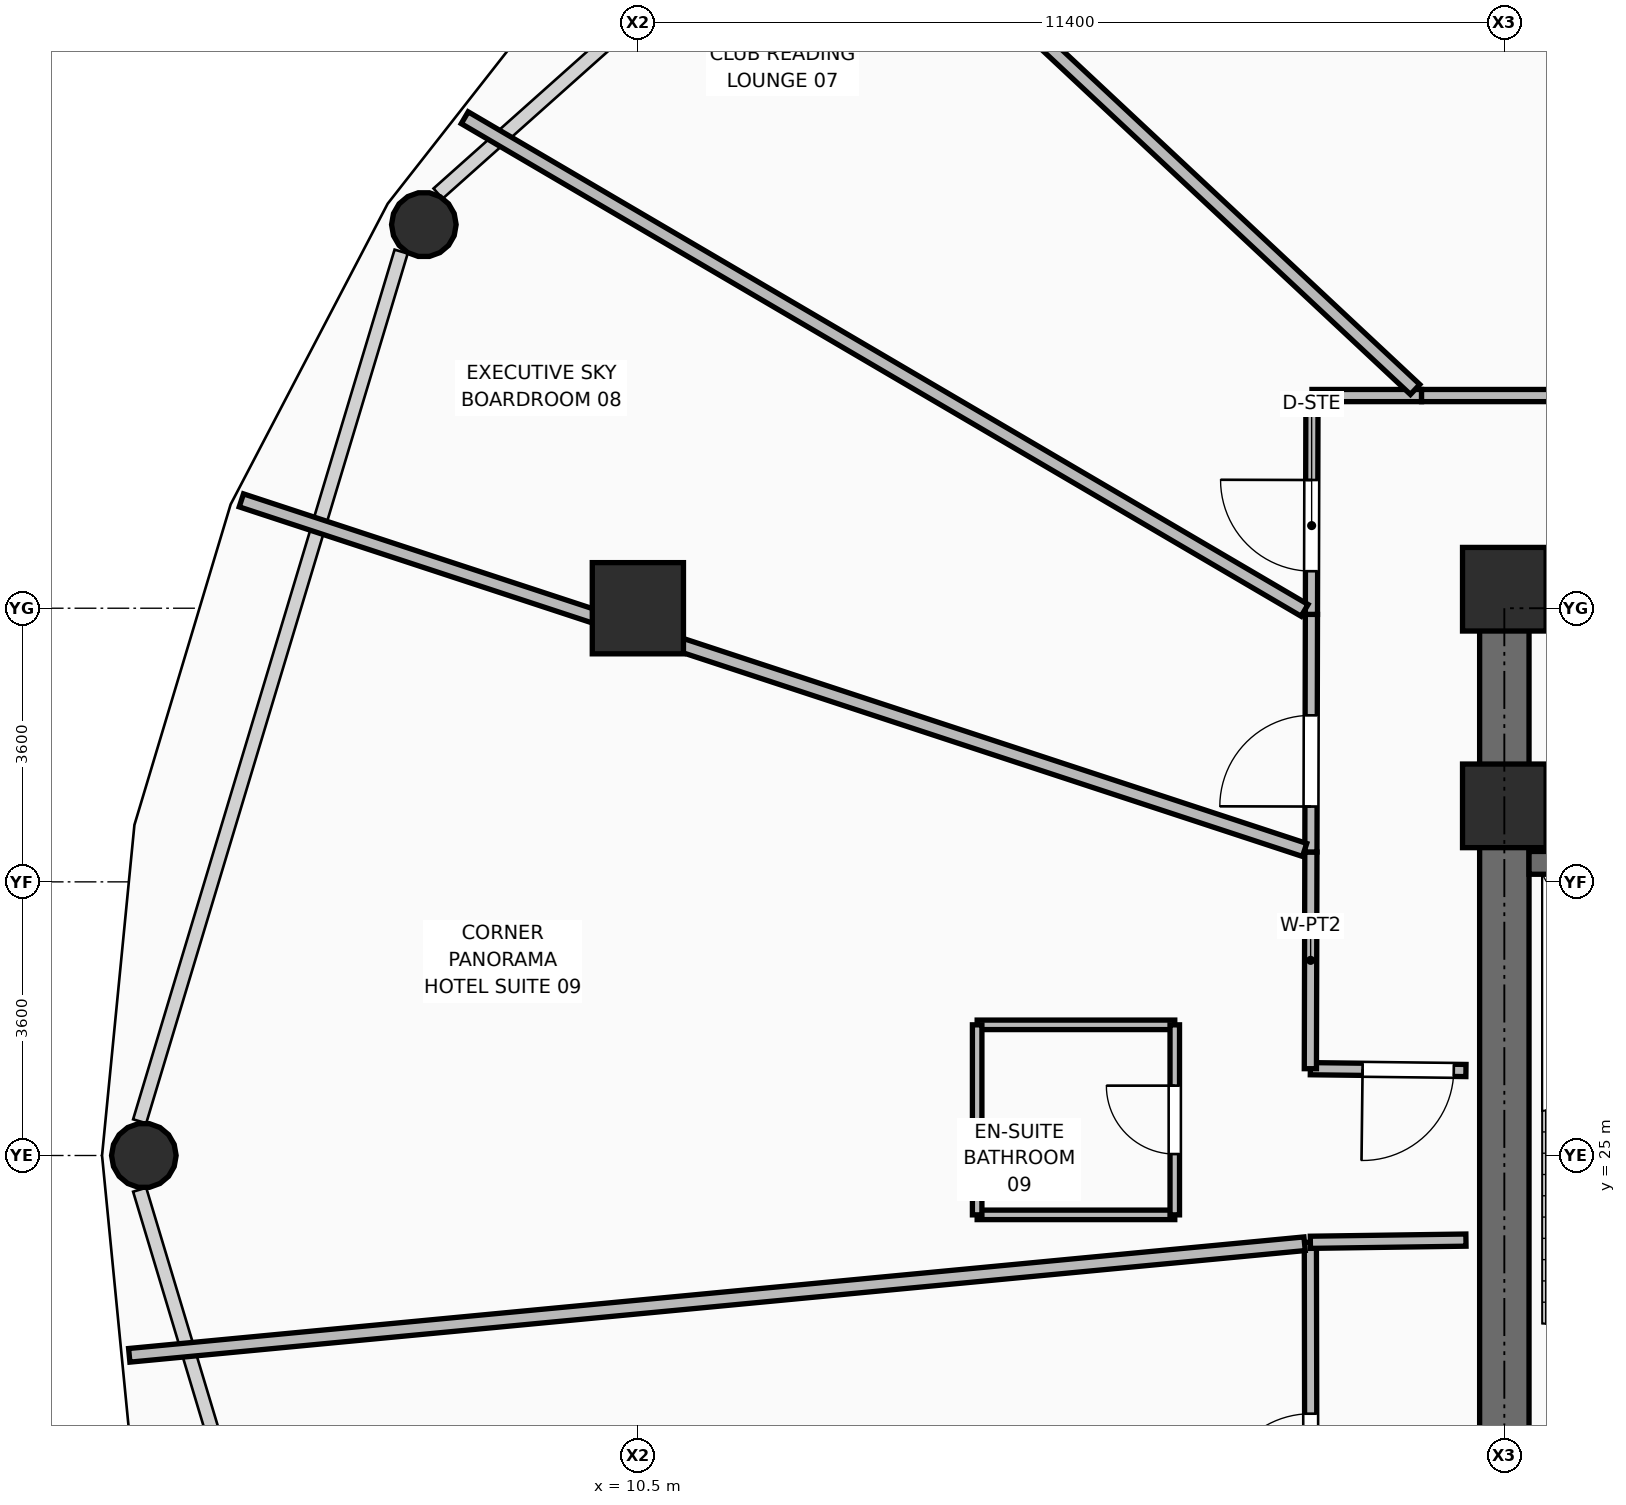
"""IFC4 building model, lengths in metres.
Left out: names, types, materials, properties, quantities, classifications, styles, units other than length and angle.
Written with IfcOpenShell. Run it as: python <this file> out.ifc"""

import sys

from ifc_helpers import new_model, si_unit, direction, frame, frame_2d, origin, origin_2d, place, context, subcontext, project, spatial, rectangle, hollow_rectangle, hollow_circle, extrude, element, fill, save


model = new_model("IFC4")
c1 = context("Model", 3, precision=1e-05, world=origin(), true_north=direction((0.0, 1.0)))
c2 = subcontext(c1, "Body", "Model", "MODEL_VIEW")
j1 = project(units=[si_unit("LENGTHUNIT", "METRE"), si_unit("PLANEANGLEUNIT", "RADIAN")], contexts=[c1])
p1 = place(None, origin())
s1 = spatial("IfcSite", under=j1, at=p1, CompositionType="ELEMENT")
p2 = place(p1, origin())
s2 = spatial("IfcBuilding", under=s1, at=p2, CompositionType="ELEMENT")
p3 = place(p2, frame((0.0, 0.0, 83.25)))
s3 = spatial("IfcBuildingStorey", under=s2, at=p3, CompositionType="ELEMENT", Elevation=83.25)
for number, where, z_axis, x_axis in (
    (1, (21.9, 29.6, 0.0), (0.0, 0.0, 1.0), (1.0, 0.0, 0.0)),
    (2, (21.9, 32.45, 0.0), (0.0, 0.0, 1.0), (1.0, 0.0, 0.0)),
):
    element("IfcColumn", number, at=place(p3, frame(where, z_axis=z_axis, x_axis=x_axis)), inside=s3, PredefinedType="COLUMN", context=c2, shape_type="SweptSolid", body=[
        extrude(rectangle(XDim=1.1, YDim=1.1, at=origin_2d()), origin(), (0.0, 0.0, 1.0), 3.75),
    ])
p4 = place(p3, frame((10.5, 32.2, 0.0), z_axis=(0.0, 0.0, 1.0), x_axis=(1.0, 0.0, 0.0)))
e3 = element("IfcColumn", 3, at=p4, inside=s3, PredefinedType="COLUMN", context=c2, shape_type="SweptSolid", body=[
    extrude(hollow_rectangle(XDim=1.2, YDim=1.2, WallThickness=0.045, at=origin_2d()), origin(), (0.0, 0.0, 1.0), 3.75),
])
for number, where, z_axis, x_axis in (
    (4, (7.684, 37.247, 0.0), (0.0, 0.0, 1.0), (1.0, 0.0, 0.0)),
    (5, (4.0, 25.0, 0.0), (0.0, 0.0, 1.0), (1.0, 0.0, 0.0)),
):
    element("IfcColumn", number, at=place(p3, frame(where, z_axis=z_axis, x_axis=x_axis)), inside=s3, PredefinedType="COLUMN", context=c2, shape_type="SweptSolid", body=[
        extrude(hollow_circle(Radius=0.425, WallThickness=0.04, at=origin_2d()), origin(), (0.0, 0.0, 1.0), 3.57),
    ])
p5 = place(p3, frame((21.575, 32.45, 0.0), z_axis=(0.0, 0.0, 1.0), x_axis=(1.0, 0.0, 0.0)))
e6 = element("IfcWall", 6, at=p5, inside=s3, PredefinedType="SHEAR", context=c2, shape_type="SweptSolid", body=[
    extrude(rectangle(XDim=19.85, YDim=0.65, at=frame_2d((9.925, 0.0))), origin(), (0.0, 0.0, 1.0), 3.57),
])
p6 = place(p5, frame((2.175, 0.0, 0.0)))
e7 = element("IfcOpeningElement", 7, at=p6, cuts=e6, PredefinedType="OPENING", context=c2, shape_type="SweptSolid", body=[
    extrude(rectangle(XDim=1.1, YDim=2.1, at=frame_2d((0.55, 1.05))), frame((0.0, 0.335, 0.0), z_axis=(0.0, -1.0, 0.0), x_axis=(1.0, 0.0, 0.0)), (0.0, 0.0, 1.0), 0.67),
])
p7 = place(p5, frame((15.565, 0.0, 0.0)))
e8 = element("IfcOpeningElement", 8, at=p7, cuts=e6, PredefinedType="OPENING", context=c2, shape_type="SweptSolid", body=[
    extrude(rectangle(XDim=1.0, YDim=2.1, at=frame_2d((0.5, 1.05))), frame((0.0, 0.335, 0.0), z_axis=(0.0, -1.0, 0.0), x_axis=(1.0, 0.0, 0.0)), (0.0, 0.0, 1.0), 0.67),
])
p8 = place(p5, frame((17.575, 0.0, 0.0)))
e9 = element("IfcOpeningElement", 9, at=p8, cuts=e6, PredefinedType="OPENING", context=c2, shape_type="SweptSolid", body=[
    extrude(rectangle(XDim=0.9, YDim=2.1, at=frame_2d((0.45, 1.05))), frame((0.0, 0.335, 0.0), z_axis=(0.0, -1.0, 0.0), x_axis=(1.0, 0.0, 0.0)), (0.0, 0.0, 1.0), 0.67),
])
p9 = place(p3, frame((21.9, 18.125, 0.0), z_axis=(0.0, 0.0, 1.0), x_axis=(0.0, 1.0, 0.0)))
e10 = element("IfcWall", 10, at=p9, inside=s3, PredefinedType="SHEAR", context=c2, shape_type="SweptSolid", body=[
    extrude(rectangle(XDim=14.0, YDim=0.65, at=frame_2d((7.0, 0.0))), origin(), (0.0, 0.0, 1.0), 3.57),
])
p10 = place(p3, frame((22.225, 28.85, 0.0), z_axis=(0.0, 0.0, 1.0), x_axis=(1.0, 0.0, 0.0)))
e11 = element("IfcWall", 11, at=p10, inside=s3, PredefinedType="SHEAR", context=c2, shape_type="SweptSolid", body=[
    extrude(rectangle(XDim=3.515, YDim=0.3, at=frame_2d((1.757, 0.0))), origin(), (0.0, 0.0, 1.0), 3.57),
])
p11 = place(p3, frame((21.395, 26.118, 0.0), z_axis=(0.0, 0.0, 1.0), x_axis=(-0.999930307049, 0.011805975003, 0.0)))
e12 = element("IfcWall", 12, at=p11, inside=s3, PredefinedType="PARTITIONING", context=c2, shape_type="SweptSolid", body=[
    extrude(rectangle(XDim=2.047, YDim=0.16, at=frame_2d((1.024, 0.0))), origin(), (0.0, 0.0, 1.0), 3.55),
])
p12 = place(p11, frame((0.16, 0.0, 0.0)))
e13 = element("IfcOpeningElement", 13, at=p12, cuts=e12, PredefinedType="OPENING", context=c2, shape_type="SweptSolid", body=[
    extrude(rectangle(XDim=1.2, YDim=2.1, at=frame_2d((0.6, 1.05))), frame((0.0, 0.09, 0.0), z_axis=(0.0, -1.0, 0.0), x_axis=(1.0, 0.0, 0.0)), (0.0, 0.0, 1.0), 0.18),
])
p13 = place(p3, frame((19.348, 26.142, 0.0), z_axis=(0.0, 0.0, 1.0), x_axis=(0.002483506942, 0.999996916092, 0.0)))
e14 = element("IfcWall", 14, at=p13, inside=s3, PredefinedType="PARTITIONING", context=c2, shape_type="SweptSolid", body=[
    extrude(rectangle(XDim=2.851, YDim=0.16, at=frame_2d((1.425, 0.0))), origin(), (0.0, 0.0, 1.0), 3.55),
])
p14 = place(p3, frame((19.355, 28.993, 0.0), z_axis=(0.0, 0.0, 1.0), x_axis=(0.002264911404, 0.999997435085, 0.0)))
e15 = element("IfcWall", 15, at=p14, inside=s3, PredefinedType="PARTITIONING", context=c2, shape_type="SweptSolid", body=[
    extrude(rectangle(XDim=3.126, YDim=0.16, at=frame_2d((1.563, 0.0))), origin(), (0.0, 0.0, 1.0), 3.55),
])
p15 = place(p14, frame((0.598, 0.0, 0.0)))
e16 = element("IfcOpeningElement", 16, at=p15, cuts=e15, PredefinedType="OPENING", context=c2, shape_type="SweptSolid", body=[
    extrude(rectangle(XDim=1.2, YDim=2.1, at=frame_2d((0.6, 1.05))), frame((0.0, 0.09, 0.0), z_axis=(0.0, -1.0, 0.0), x_axis=(1.0, 0.0, 0.0)), (0.0, 0.0, 1.0), 0.18),
])
p16 = place(p3, frame((19.362, 32.119, 0.0), z_axis=(0.0, 0.0, 1.0), x_axis=(0.002374283141, 0.999997181386, 0.0)))
e17 = element("IfcWall", 17, at=p16, inside=s3, PredefinedType="PARTITIONING", context=c2, shape_type="SweptSolid", body=[
    extrude(rectangle(XDim=2.879, YDim=0.16, at=frame_2d((1.439, 0.0))), origin(), (0.0, 0.0, 1.0), 2.928),
])
p17 = place(p16, frame((0.568, 0.0, 0.0)))
e18 = element("IfcOpeningElement", 18, at=p17, cuts=e17, PredefinedType="OPENING", context=c2, shape_type="SweptSolid", body=[
    extrude(rectangle(XDim=1.2, YDim=2.1, at=frame_2d((0.6, 1.05))), frame((0.0, 0.09, 0.0), z_axis=(0.0, -1.0, 0.0), x_axis=(1.0, 0.0, 0.0)), (0.0, 0.0, 1.0), 0.18),
])
p18 = place(p3, frame((19.369, 34.998, 0.0), z_axis=(0.0, 0.0, 1.0), x_axis=(1.0, 0.0, 0.0)))
e19 = element("IfcWall", 19, at=p18, inside=s3, PredefinedType="PARTITIONING", context=c2, shape_type="SweptSolid", body=[
    extrude(rectangle(XDim=1.442, YDim=0.16, at=frame_2d((0.721, 0.0))), origin(), (0.0, 0.0, 1.0), 3.55),
])
p19 = place(p3, frame((20.811, 34.998, 0.0), z_axis=(0.0, 0.0, 1.0), x_axis=(1.0, 0.0, 0.0)))
e20 = element("IfcWall", 20, at=p19, inside=s3, PredefinedType="PARTITIONING", context=c2, shape_type="SweptSolid", body=[
    extrude(rectangle(XDim=7.092, YDim=0.16, at=frame_2d((3.546, 0.0))), origin(), (0.0, 0.0, 1.0), 2.928),
])
p20 = place(p19, frame((2.799, 0.0, 0.0)))
e21 = element("IfcOpeningElement", 21, at=p20, cuts=e20, PredefinedType="OPENING", context=c2, shape_type="SweptSolid", body=[
    extrude(rectangle(XDim=1.2, YDim=2.1, at=frame_2d((0.6, 1.05))), frame((0.0, 0.09, 0.0), z_axis=(0.0, -1.0, 0.0), x_axis=(1.0, 0.0, 0.0)), (0.0, 0.0, 1.0), 0.18),
])
p21 = place(p3, frame((19.358, 18.147, 0.0), z_axis=(0.0, 0.0, 1.0), x_axis=(-0.001752733286, 0.999998463962, 0.0)))
e22 = element("IfcWall", 22, at=p21, inside=s3, PredefinedType="PARTITIONING", context=c2, shape_type="SweptSolid", body=[
    extrude(rectangle(XDim=5.711, YDim=0.16, at=frame_2d((2.855, 0.0))), origin(), (0.0, 0.0, 1.0), 2.928),
])
p22 = place(p21, frame((2.256, 0.0, 0.0)))
e23 = element("IfcOpeningElement", 23, at=p22, cuts=e22, PredefinedType="OPENING", context=c2, shape_type="SweptSolid", body=[
    extrude(rectangle(XDim=1.2, YDim=2.1, at=frame_2d((0.6, 1.05))), frame((0.0, 0.09, 0.0), z_axis=(0.0, -1.0, 0.0), x_axis=(1.0, 0.0, 0.0)), (0.0, 0.0, 1.0), 0.18),
])
p23 = place(p3, frame((19.348, 23.858, 0.0), z_axis=(0.0, 0.0, 1.0), x_axis=(0.999899308643, 0.014190580528, 0.0)))
e24 = element("IfcWall", 24, at=p23, inside=s3, PredefinedType="PARTITIONING", context=c2, shape_type="SweptSolid", body=[
    extrude(rectangle(XDim=2.047, YDim=0.16, at=frame_2d((1.024, 0.0))), origin(), (0.0, 0.0, 1.0), 3.55),
])
p24 = place(p3, frame((20.726, 35.078, 0.0), z_axis=(0.0, 0.0, 1.0), x_axis=(-0.730389203883, 0.683031193176, 0.0)))
e25 = element("IfcWall", 25, at=p24, inside=s3, PredefinedType="PARTITIONING", context=c2, shape_type="SweptSolid", body=[
    extrude(rectangle(XDim=11.573, YDim=0.18, at=frame_2d((5.787, 0.0))), origin(), (0.0, 0.0, 1.0), 2.775),
])
p25 = place(p3, frame((19.272, 32.172, 0.0), z_axis=(0.0, 0.0, 1.0), x_axis=(-0.862584123078, 0.505913659248, 0.0)))
e26 = element("IfcWall", 26, at=p25, inside=s3, PredefinedType="PARTITIONING", context=c2, shape_type="SweptSolid", body=[
    extrude(rectangle(XDim=12.81, YDim=0.18, at=frame_2d((6.405, 0.0))), origin(), (0.0, 0.0, 1.0), 2.775),
])
p26 = place(p3, frame((19.272, 29.02, 0.0), z_axis=(0.0, 0.0, 1.0), x_axis=(-0.949981656655, 0.312305702829, 0.0)))
e27 = element("IfcWall", 27, at=p26, inside=s3, PredefinedType="PARTITIONING", context=c2, shape_type="SweptSolid", body=[
    extrude(rectangle(XDim=14.726, YDim=0.18, at=frame_2d((7.363, 0.0))), origin(), (0.0, 0.0, 1.0), 2.775),
])
p27 = place(p3, frame((19.272, 23.839, 0.0), z_axis=(0.0, 0.0, 1.0), x_axis=(-0.995524176843, -0.094507213062, 0.0)))
e28 = element("IfcWall", 28, at=p27, inside=s3, PredefinedType="PARTITIONING", context=c2, shape_type="SweptSolid", body=[
    extrude(rectangle(XDim=15.533, YDim=0.18, at=frame_2d((7.767, 0.0))), origin(), (0.0, 0.0, 1.0), 2.775),
])
for number, where, z_axis, x_axis in (
    (29, (14.964, 24.219, 0.0), (0.0, 0.0, 1.0), (1.0, 0.0, 0.0)),
    (30, (14.964, 26.719, 0.0), (0.0, 0.0, 1.0), (1.0, 0.0, 0.0)),
):
    element("IfcWall", number, at=place(p3, frame(where, z_axis=z_axis, x_axis=x_axis)), inside=s3, PredefinedType="PARTITIONING", context=c2, shape_type="SweptSolid", body=[
        extrude(rectangle(XDim=2.6, YDim=0.125, at=frame_2d((1.3, 0.0))), origin(), (0.0, 0.0, 1.0), 3.55),
    ])
p28 = place(p3, frame((14.964, 24.219, 0.0), z_axis=(0.0, 0.0, 1.0), x_axis=(0.0, 1.0, 0.0)))
e31 = element("IfcWall", 31, at=p28, inside=s3, PredefinedType="PARTITIONING", context=c2, shape_type="SweptSolid", body=[
    extrude(rectangle(XDim=2.5, YDim=0.125, at=frame_2d((1.25, 0.0))), origin(), (0.0, 0.0, 1.0), 3.55),
])
p29 = place(p3, frame((17.564, 24.219, 0.0), z_axis=(0.0, 0.0, 1.0), x_axis=(0.0, 1.0, 0.0)))
e32 = element("IfcWall", 32, at=p29, inside=s3, PredefinedType="PARTITIONING", context=c2, shape_type="SweptSolid", body=[
    extrude(rectangle(XDim=2.5, YDim=0.125, at=frame_2d((1.25, 0.0))), origin(), (0.0, 0.0, 1.0), 3.55),
])
p30 = place(p29, frame((0.8, 0.0, 0.0)))
e33 = element("IfcOpeningElement", 33, at=p30, cuts=e32, PredefinedType="OPENING", context=c2, shape_type="SweptSolid", body=[
    extrude(rectangle(XDim=0.9, YDim=2.1, at=frame_2d((0.45, 1.05))), frame((0.0, 0.073, 0.0), z_axis=(0.0, -1.0, 0.0), x_axis=(1.0, 0.0, 0.0)), (0.0, 0.0, 1.0), 0.145),
])
p31 = place(p17, origin())
e34 = element("IfcDoor", 34, at=p31, inside=s3, OperationType="SINGLE_SWING_RIGHT", PredefinedType="DOOR", context=c2, shape_type="SweptSolid", body=[
    extrude(rectangle(XDim=1.2, YDim=2.1, at=frame_2d((0.6, 1.05))), frame((0.0, 0.025, 0.0), z_axis=(0.0, -1.0, 0.0), x_axis=(1.0, 0.0, 0.0)), (0.0, 0.0, 1.0), 0.05),
])
fill(e18, e34)
p32 = place(p15, origin())
e35 = element("IfcDoor", 35, at=p32, inside=s3, OperationType="SINGLE_SWING_LEFT", PredefinedType="DOOR", context=c2, shape_type="SweptSolid", body=[
    extrude(rectangle(XDim=1.2, YDim=2.1, at=frame_2d((0.6, 1.05))), frame((0.0, 0.025, 0.0), z_axis=(0.0, -1.0, 0.0), x_axis=(1.0, 0.0, 0.0)), (0.0, 0.0, 1.0), 0.05),
])
fill(e16, e35)
p33 = place(p30, origin())
e36 = element("IfcDoor", 36, at=p33, inside=s3, OperationType="SINGLE_SWING_RIGHT", PredefinedType="DOOR", context=c2, shape_type="SweptSolid", body=[
    extrude(rectangle(XDim=0.9, YDim=2.1, at=frame_2d((0.45, 1.05))), frame((0.0, 0.025, 0.0), z_axis=(0.0, -1.0, 0.0), x_axis=(1.0, 0.0, 0.0)), (0.0, 0.0, 1.0), 0.05),
])
fill(e33, e36)
p34 = place(p12, origin())
e37 = element("IfcDoor", 37, at=p34, inside=s3, OperationType="SINGLE_SWING_RIGHT", PredefinedType="DOOR", context=c2, shape_type="SweptSolid", body=[
    extrude(rectangle(XDim=1.2, YDim=2.1, at=frame_2d((0.6, 1.05))), frame((0.0, 0.025, 0.0), z_axis=(0.0, -1.0, 0.0), x_axis=(1.0, 0.0, 0.0)), (0.0, 0.0, 1.0), 0.05),
])
fill(e13, e37)
p35 = place(p22, origin())
e38 = element("IfcDoor", 38, at=p35, inside=s3, OperationType="SINGLE_SWING_LEFT", PredefinedType="DOOR", context=c2, shape_type="SweptSolid", body=[
    extrude(rectangle(XDim=1.2, YDim=2.1, at=frame_2d((0.6, 1.05))), frame((0.0, 0.025, 0.0), z_axis=(0.0, -1.0, 0.0), x_axis=(1.0, 0.0, 0.0)), (0.0, 0.0, 1.0), 0.05),
])
fill(e23, e38)
save(model, sys.argv[1])
